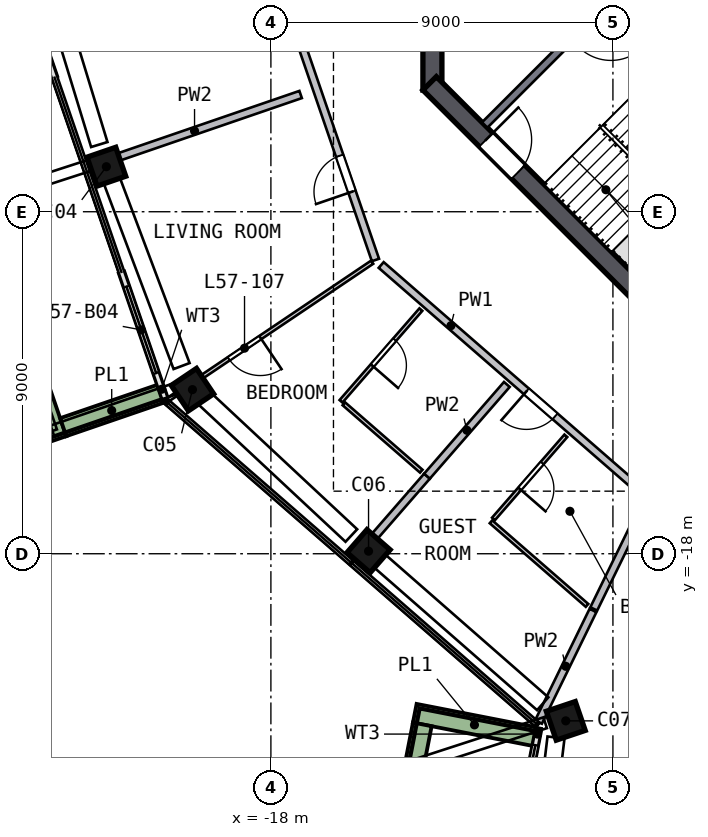
"""IFC4 building model, lengths in metres.
Left out: names, types, materials, properties, quantities, classifications, styles, units other than length and angle.
Written with IfcOpenShell. Run it as: python <this file> out.ifc"""

import sys

from ifc_helpers import new_model, si_unit, direction, frame, frame_2d, origin, origin_2d, place, context, subcontext, project, spatial, rectangle, extrude, element, fill, save


model = new_model("IFC4")
c1 = context("Model", 3, precision=1e-05, world=origin(), true_north=direction((0.0, 1.0)))
c2 = subcontext(c1, "Body", "Model", "MODEL_VIEW")
j1 = project(units=[si_unit("LENGTHUNIT", "METRE"), si_unit("PLANEANGLEUNIT", "RADIAN")], contexts=[c1])
p1 = place(None, origin())
s1 = spatial("IfcSite", under=j1, at=p1, CompositionType="ELEMENT")
p2 = place(p1, origin())
s2 = spatial("IfcBuilding", under=s1, at=p2, CompositionType="ELEMENT")
p3 = place(p2, frame((0.0, 0.0, 234.0)))
s3 = spatial("IfcBuildingStorey", under=s2, at=p3, CompositionType="ELEMENT", Elevation=234.0)
p4 = place(p3, frame((-22.375, -7.687, 0.0), z_axis=(0.037491609, -0.106162851, 0.9936417), x_axis=(0.322917335, -0.939706935, -0.112584504)))
e1 = element("IfcColumn", 1, at=p4, inside=s3, PredefinedType="COLUMN", context=c2, shape_type="SweptSolid", body=[
    extrude(rectangle(XDim=0.8, YDim=0.8, at=origin_2d()), origin(), (0.0, 0.0, 1.0), 3.21),
])
p5 = place(p3, frame((-20.143, -13.566, 0.0), z_axis=(0.06530323, -0.09525605, 0.993308498), x_axis=(-0.55467947, 0.824010563, 0.115487135)))
e2 = element("IfcColumn", 2, at=p5, inside=s3, PredefinedType="COLUMN", context=c2, shape_type="SweptSolid", body=[
    extrude(rectangle(XDim=0.8, YDim=0.8, at=origin_2d()), origin(), (0.0, 0.0, 1.0), 3.211),
])
p6 = place(p3, frame((-15.534, -17.844, 0.0), z_axis=(0.085478103, -0.073234353, 0.993644918), x_axis=(0.749060992, -0.652869631, -0.112556101)))
e3 = element("IfcColumn", 3, at=p6, inside=s3, PredefinedType="COLUMN", context=c2, shape_type="SweptSolid", body=[
    extrude(rectangle(XDim=0.8, YDim=0.8, at=origin_2d()), origin(), (0.0, 0.0, 1.0), 3.21),
])
p7 = place(p3, frame((-10.37, -22.34, 0.0), z_axis=(0.106638983, -0.048416987, 0.993118282), x_axis=(-0.317375559, 0.944907097, 0.080145701)))
e4 = element("IfcColumn", 4, at=p7, inside=s3, PredefinedType="COLUMN", context=c2, shape_type="SweptSolid", body=[
    extrude(rectangle(XDim=0.8, YDim=0.8, at=origin_2d()), origin(), (0.0, 0.0, 1.0), 3.212),
])
p8 = place(p3, frame((-13.75, 5.799, 0.0), z_axis=(0.0, 0.0, 1.0), x_axis=(0.0, -1.0, 0.0)))
e5 = element("IfcWall", 5, at=p8, inside=s3, PredefinedType="SHEAR", context=c2, shape_type="SweptSolid", body=[
    extrude(rectangle(XDim=11.598, YDim=0.5, at=frame_2d((5.799, 0.0))), origin(), (0.0, 0.0, 1.0), 3.5),
])
p9 = place(p8, frame((4.899, 0.0, 0.0)))
e6 = element("IfcOpeningElement", 6, at=p9, cuts=e5, PredefinedType="OPENING", context=c2, shape_type="SweptSolid", body=[
    extrude(rectangle(XDim=1.8, YDim=2.1, at=frame_2d((0.9, 1.05))), frame((0.0, 0.26, 0.0), z_axis=(0.0, -1.0, 0.0), x_axis=(1.0, 0.0, 0.0)), (0.0, 0.0, 1.0), 0.52),
])
p10 = place(p3, frame((-13.823, -5.622, 0.0), z_axis=(0.0, 0.0, 1.0), x_axis=(0.707106781, -0.707106781, 0.0)))
e7 = element("IfcWall", 7, at=p10, inside=s3, PredefinedType="SHEAR", context=c2, shape_type="SweptSolid", body=[
    extrude(rectangle(XDim=11.598, YDim=0.5, at=frame_2d((5.799, 0.0))), origin(), (0.0, 0.0, 1.0), 3.5),
])
p11 = place(p10, frame((2.099, 0.0, 0.0)))
e8 = element("IfcOpeningElement", 8, at=p11, cuts=e7, PredefinedType="OPENING", context=c2, shape_type="SweptSolid", body=[
    extrude(rectangle(XDim=1.2, YDim=2.1, at=frame_2d((0.6, 1.05))), frame((0.0, 0.26, 0.0), z_axis=(0.0, -1.0, 0.0), x_axis=(1.0, 0.0, 0.0)), (0.0, 0.0, 1.0), 0.52),
])
p12 = place(p3, frame((-24.951, -1.805, 0.0), z_axis=(0.0, 0.0, 1.0), x_axis=(0.324897842, -0.945749117, 0.0)))
e9 = element("IfcWall", 9, at=p12, inside=s3, PredefinedType="SOLIDWALL", context=c2, shape_type="SweptSolid", body=[
    extrude(rectangle(XDim=3.863, YDim=0.15, at=frame_2d((1.932, 0.0))), origin(), (0.0, 0.0, 1.0), 2.525),
])
p13 = place(p12, frame((1.063, 0.0, 0.0)))
e10 = element("IfcOpeningElement", 10, at=p13, cuts=e9, PredefinedType="OPENING", context=c2, shape_type="SweptSolid", body=[
    extrude(rectangle(XDim=2.4, YDim=2.4, at=frame_2d((1.2, 1.2))), frame((0.0, 0.085, 0.0), z_axis=(0.0, -1.0, 0.0), x_axis=(1.0, 0.0, 0.0)), (0.0, 0.0, 1.0), 0.17),
])
p14 = place(p3, frame((-21.93, -10.596, 0.0), z_axis=(0.0, 0.0, 1.0), x_axis=(0.324888935, -0.945752177, 0.0)))
e11 = element("IfcWall", 11, at=p14, inside=s3, PredefinedType="SOLIDWALL", context=c2, shape_type="SweptSolid", body=[
    extrude(rectangle(XDim=3.504, YDim=0.15, at=frame_2d((1.752, 0.0))), origin(), (0.0, 0.0, 1.0), 2.525),
])
p15 = place(p14, frame((0.4, 0.0, 0.0)))
e12 = element("IfcOpeningElement", 12, at=p15, cuts=e11, PredefinedType="OPENING", context=c2, shape_type="SweptSolid", body=[
    extrude(rectangle(XDim=2.4, YDim=2.4, at=frame_2d((1.2, 1.2))), frame((0.0, 0.085, 0.0), z_axis=(0.0, -1.0, 0.0), x_axis=(1.0, 0.0, 0.0)), (0.0, 0.0, 1.0), 0.17),
])
p16 = place(p3, frame((-10.965, -22.648, 0.0), z_axis=(0.0, 0.0, 1.0), x_axis=(-0.191492434, -0.981494089, 0.0)))
e13 = element("IfcWall", 13, at=p16, inside=s3, PredefinedType="SOLIDWALL", context=c2, shape_type="SweptSolid", body=[
    extrude(rectangle(XDim=3.2, YDim=0.15, at=frame_2d((1.6, 0.0))), origin(), (0.0, 0.0, 1.0), 2.525),
])
p17 = place(p16, frame((0.4, 0.0, 0.0)))
e14 = element("IfcOpeningElement", 14, at=p17, cuts=e13, PredefinedType="OPENING", context=c2, shape_type="SweptSolid", body=[
    extrude(rectangle(XDim=2.4, YDim=2.4, at=frame_2d((1.2, 1.2))), frame((0.0, 0.085, 0.0), z_axis=(0.0, -1.0, 0.0), x_axis=(1.0, 0.0, 0.0)), (0.0, 0.0, 1.0), 0.17),
])
p18 = place(p3, frame((-28.079, -2.009, 0.0), z_axis=(0.0, 0.0, 1.0), x_axis=(0.324897792, -0.945749134, 0.0)))
e15 = element("IfcWall", 15, at=p18, inside=s3, PredefinedType="SOLIDWALL", context=c2, shape_type="SweptSolid", body=[
    extrude(rectangle(XDim=13.724, YDim=0.5, at=frame_2d((6.862, 0.0))), origin(), (0.0, 0.0, 1.0), 0.7),
])
p19 = place(p3, frame((-23.465, -14.67, 0.0), z_axis=(0.0, 0.0, 1.0), x_axis=(0.945739598, 0.324925551, 0.0)))
e16 = element("IfcWall", 16, at=p19, inside=s3, PredefinedType="SOLIDWALL", context=c2, shape_type="SweptSolid", body=[
    extrude(rectangle(XDim=2.699, YDim=0.5, at=frame_2d((1.35, 0.0))), origin(), (0.0, 0.0, 1.0), 0.7),
])
p20 = place(p3, frame((-11.074, -22.81, 0.0), z_axis=(0.0, 0.0, 1.0), x_axis=(-0.981494441, 0.191490634, 0.0)))
e17 = element("IfcWall", 17, at=p20, inside=s3, PredefinedType="SOLIDWALL", context=c2, shape_type="SweptSolid", body=[
    extrude(rectangle(XDim=3.199, YDim=0.5, at=frame_2d((1.599, 0.0))), origin(), (0.0, 0.0, 1.0), 0.7),
])
p21 = place(p3, frame((-14.016, -22.49, 0.0), z_axis=(0.0, 0.0, 1.0), x_axis=(-0.191513122, -0.981490053, 0.0)))
e18 = element("IfcWall", 18, at=p21, inside=s3, PredefinedType="SOLIDWALL", context=c2, shape_type="SweptSolid", body=[
    extrude(rectangle(XDim=8.307, YDim=0.5, at=frame_2d((4.153, 0.0))), origin(), (0.0, 0.0, 1.0), 0.7),
])
p22 = place(p3, frame((-3.535, -9.334, 0.0), z_axis=(0.0, 0.0, 1.0), x_axis=(-0.707120946, 0.707092617, 0.0)))
e19 = element("IfcWall", 19, at=p22, inside=s3, PredefinedType="SOLIDWALL", context=c2, shape_type="SweptSolid", body=[
    extrude(rectangle(XDim=8.618, YDim=0.2, at=frame_2d((4.309, 0.0))), origin(), (0.0, 0.0, 1.0), 3.19),
])
p23 = place(p22, frame((6.6, 0.0, 0.0)))
e20 = element("IfcOpeningElement", 20, at=p23, cuts=e19, PredefinedType="OPENING", context=c2, shape_type="SweptSolid", body=[
    extrude(rectangle(XDim=1.2, YDim=2.1, at=frame_2d((0.6, 1.05))), frame((0.0, 0.11, 0.0), z_axis=(0.0, -1.0, 0.0), x_axis=(1.0, 0.0, 0.0)), (0.0, 0.0, 1.0), 0.22),
])
p24 = place(p3, frame((-9.334, -3.677, 0.0), z_axis=(0.0, 0.0, 1.0), x_axis=(-0.707135168, -0.707078393, 0.0)))
e21 = element("IfcWall", 21, at=p24, inside=s3, PredefinedType="SOLIDWALL", context=c2, shape_type="SweptSolid", body=[
    extrude(rectangle(XDim=4.3, YDim=0.2, at=frame_2d((2.15, 0.0))), origin(), (0.0, 0.0, 1.0), 3.19),
])
p25 = place(p3, frame((-15.249, -10.27, 0.0), z_axis=(0.0, 0.0, 1.0), x_axis=(-0.324901791, 0.94574776, 0.0)))
e22 = element("IfcWall", 22, at=p25, inside=s3, PredefinedType="SOLIDWALL", context=c2, shape_type="SweptSolid", body=[
    extrude(rectangle(XDim=9.316, YDim=0.2, at=frame_2d((4.658, 0.0))), origin(), (0.0, 0.0, 1.0), 3.19),
])
p26 = place(p25, frame((1.9, 0.0, 0.0)))
e23 = element("IfcOpeningElement", 23, at=p26, cuts=e22, PredefinedType="OPENING", context=c2, shape_type="SweptSolid", body=[
    extrude(rectangle(XDim=1.0, YDim=2.1, at=frame_2d((0.5, 1.05))), frame((0.0, 0.11, 0.0), z_axis=(0.0, -1.0, 0.0), x_axis=(1.0, 0.0, 0.0)), (0.0, 0.0, 1.0), 0.22),
])
p27 = place(p3, frame((-8.222, -16.387, 0.0), z_axis=(0.0, 0.0, 1.0), x_axis=(-0.754251424, 0.656585706, 0.0)))
e24 = element("IfcWall", 24, at=p27, inside=s3, PredefinedType="SOLIDWALL", context=c2, shape_type="SweptSolid", body=[
    extrude(rectangle(XDim=9.117, YDim=0.2, at=frame_2d((4.558, 0.0))), origin(), (0.0, 0.0, 1.0), 3.19),
])
p28 = place(p27, frame((3.05, 0.0, 0.0)))
e25 = element("IfcOpeningElement", 25, at=p28, cuts=e24, PredefinedType="OPENING", context=c2, shape_type="SweptSolid", body=[
    extrude(rectangle(XDim=1.0, YDim=2.1, at=frame_2d((0.5, 1.05))), frame((0.0, 0.11, 0.0), z_axis=(0.0, -1.0, 0.0), x_axis=(1.0, 0.0, 0.0)), (0.0, 0.0, 1.0), 0.22),
])
p29 = place(p3, frame((-17.218, -5.915, 0.0), z_axis=(0.0, 0.0, 1.0), x_axis=(-0.945735464, -0.324937582, 0.0)))
e26 = element("IfcWall", 26, at=p29, inside=s3, PredefinedType="SOLIDWALL", context=c2, shape_type="SweptSolid", body=[
    extrude(rectangle(XDim=5.903, YDim=0.2, at=frame_2d((2.951, 0.0))), origin(), (0.0, 0.0, 1.0), 3.19),
])
p30 = place(p3, frame((-13.892, -15.959, 0.0), z_axis=(0.0, 0.0, 1.0), x_axis=(-0.656586393, -0.754250826, 0.0)))
e27 = element("IfcWall", 27, at=p30, inside=s3, PredefinedType="SOLIDWALL", context=c2, shape_type="SweptSolid", body=[
    extrude(rectangle(XDim=2.95, YDim=0.2, at=frame_2d((1.475, 0.0))), origin(), (0.0, 0.0, 1.0), 3.19),
])
p31 = place(p3, frame((-11.791, -13.545, 0.0), z_axis=(0.0, 0.0, 1.0), x_axis=(-0.656590394, -0.754247343, 0.0)))
e28 = element("IfcWall", 28, at=p31, inside=s3, PredefinedType="SOLIDWALL", context=c2, shape_type="SweptSolid", body=[
    extrude(rectangle(XDim=3.2, YDim=0.2, at=frame_2d((1.6, 0.0))), origin(), (0.0, 0.0, 1.0), 3.19),
])
p32 = place(p3, frame((-10.959, -22.43, 0.0), z_axis=(0.0, 0.0, 1.0), x_axis=(0.438978354, 0.898497638, 0.0)))
e29 = element("IfcWall", 29, at=p32, inside=s3, PredefinedType="SOLIDWALL", context=c2, shape_type="SweptSolid", body=[
    extrude(rectangle(XDim=3.269, YDim=0.2, at=frame_2d((1.634, 0.0))), origin(), (0.0, 0.0, 1.0), 3.19),
])
p33 = place(p3, frame((-9.504, -19.452, 0.0), z_axis=(0.0, 0.0, 1.0), x_axis=(0.439039755, 0.898467636, 0.0)))
e30 = element("IfcWall", 30, at=p33, inside=s3, PredefinedType="SOLIDWALL", context=c2, shape_type="SweptSolid", body=[
    extrude(rectangle(XDim=3.161, YDim=0.2, at=frame_2d((1.581, 0.0))), origin(), (0.0, 0.0, 1.0), 3.19),
])
p34 = place(p3, frame((-15.335, -10.328, 0.0), z_axis=(0.0, 0.0, 1.0), x_axis=(-0.829425163, -0.558617847, 0.0)))
e31 = element("IfcWall", 31, at=p34, inside=s3, PredefinedType="PARTITIONING", context=c2, shape_type="SweptSolid", body=[
    extrude(rectangle(XDim=6.476, YDim=0.1, at=frame_2d((3.238, 0.0))), origin(), (0.0, 0.0, 1.0), 3.19),
])
p35 = place(p34, frame((3.55, 0.0, 0.0)))
e32 = element("IfcOpeningElement", 32, at=p35, cuts=e31, PredefinedType="OPENING", context=c2, shape_type="SweptSolid", body=[
    extrude(rectangle(XDim=1.0, YDim=2.1, at=frame_2d((0.5, 1.05))), frame((0.0, 0.06, 0.0), z_axis=(0.0, -1.0, 0.0), x_axis=(1.0, 0.0, 0.0)), (0.0, 0.0, 1.0), 0.12),
])
p36 = place(p3, frame((-14.054, -11.575, 0.0), z_axis=(0.0, 0.0, 1.0), x_axis=(-0.656552612, -0.754280232, 0.0)))
e33 = element("IfcWall", 33, at=p36, inside=s3, PredefinedType="PARTITIONING", context=c2, shape_type="SweptSolid", body=[
    extrude(rectangle(XDim=3.2, YDim=0.1, at=frame_2d((1.6, 0.0))), origin(), (0.0, 0.0, 1.0), 3.19),
])
p37 = place(p36, frame((1.05, 0.0, 0.0)))
e34 = element("IfcOpeningElement", 34, at=p37, cuts=e33, PredefinedType="OPENING", context=c2, shape_type="SweptSolid", body=[
    extrude(rectangle(XDim=0.9, YDim=2.1, at=frame_2d((0.45, 1.05))), frame((0.0, 0.06, 0.0), z_axis=(0.0, -1.0, 0.0), x_axis=(1.0, 0.0, 0.0)), (0.0, 0.0, 1.0), 0.12),
])
p38 = place(p3, frame((-16.08, -14.055, 0.0), z_axis=(0.0, 0.0, 1.0), x_axis=(0.754249155, -0.656588313, 0.0)))
e35 = element("IfcWall", 35, at=p38, inside=s3, PredefinedType="PARTITIONING", context=c2, shape_type="SweptSolid", body=[
    extrude(rectangle(XDim=2.7, YDim=0.1, at=frame_2d((1.35, 0.0))), origin(), (0.0, 0.0, 1.0), 3.19),
])
p39 = place(p3, frame((-10.239, -14.896, 0.0), z_axis=(0.0, 0.0, 1.0), x_axis=(-0.65654754, -0.754284646, 0.0)))
e36 = element("IfcWall", 36, at=p39, inside=s3, PredefinedType="PARTITIONING", context=c2, shape_type="SweptSolid", body=[
    extrude(rectangle(XDim=2.9, YDim=0.1, at=frame_2d((1.45, 0.0))), origin(), (0.0, 0.0, 1.0), 3.19),
])
p40 = place(p39, frame((0.95, 0.0, 0.0)))
e37 = element("IfcOpeningElement", 37, at=p40, cuts=e36, PredefinedType="OPENING", context=c2, shape_type="SweptSolid", body=[
    extrude(rectangle(XDim=0.9, YDim=2.1, at=frame_2d((0.45, 1.05))), frame((0.0, 0.06, 0.0), z_axis=(0.0, -1.0, 0.0), x_axis=(1.0, 0.0, 0.0)), (0.0, 0.0, 1.0), 0.12),
])
p41 = place(p3, frame((-9.681, -19.359, 0.0), z_axis=(0.0, 0.0, 1.0), x_axis=(-0.754239897, 0.656598948, 0.0)))
e38 = element("IfcWall", 38, at=p41, inside=s3, PredefinedType="PARTITIONING", context=c2, shape_type="SweptSolid", body=[
    extrude(rectangle(XDim=3.351, YDim=0.1, at=frame_2d((1.675, 0.0))), origin(), (0.0, 0.0, 1.0), 3.19),
])
p42 = place(p15, origin())
e39 = element("IfcDoor", 39, at=p42, inside=s3, OperationType="SLIDING_TO_RIGHT", PredefinedType="DOOR", context=c2, shape_type="SweptSolid", body=[
    extrude(rectangle(XDim=2.4, YDim=2.4, at=frame_2d((1.2, 1.2))), frame((0.0, 0.025, 0.0), z_axis=(0.0, -1.0, 0.0), x_axis=(1.0, 0.0, 0.0)), (0.0, 0.0, 1.0), 0.05),
])
fill(e12, e39)
p43 = place(p17, origin())
e40 = element("IfcDoor", 40, at=p43, inside=s3, OperationType="SLIDING_TO_LEFT", PredefinedType="DOOR", context=c2, shape_type="SweptSolid", body=[
    extrude(rectangle(XDim=2.4, YDim=2.4, at=frame_2d((1.2, 1.2))), frame((0.0, 0.025, 0.0), z_axis=(0.0, -1.0, 0.0), x_axis=(1.0, 0.0, 0.0)), (0.0, 0.0, 1.0), 0.05),
])
fill(e14, e40)
p44 = place(p11, origin())
e41 = element("IfcDoor", 41, at=p44, inside=s3, OperationType="SINGLE_SWING_LEFT", PredefinedType="DOOR", context=c2, shape_type="SweptSolid", body=[
    extrude(rectangle(XDim=1.2, YDim=2.1, at=frame_2d((0.6, 1.05))), frame((0.0, 0.025, 0.0), z_axis=(0.0, -1.0, 0.0), x_axis=(1.0, 0.0, 0.0)), (0.0, 0.0, 1.0), 0.05),
])
fill(e8, e41)
p45 = place(p26, origin())
e42 = element("IfcDoor", 42, at=p45, inside=s3, OperationType="SINGLE_SWING_LEFT", PredefinedType="DOOR", context=c2, shape_type="SweptSolid", body=[
    extrude(rectangle(XDim=1.0, YDim=2.1, at=frame_2d((0.5, 1.05))), frame((0.0, 0.025, 0.0), z_axis=(0.0, -1.0, 0.0), x_axis=(1.0, 0.0, 0.0)), (0.0, 0.0, 1.0), 0.05),
])
fill(e23, e42)
p46 = place(p35, origin())
e43 = element("IfcDoor", 43, at=p46, inside=s3, OperationType="SINGLE_SWING_LEFT", PredefinedType="DOOR", context=c2, shape_type="SweptSolid", body=[
    extrude(rectangle(XDim=1.0, YDim=2.1, at=frame_2d((0.5, 1.05))), frame((0.0, 0.025, 0.0), z_axis=(0.0, -1.0, 0.0), x_axis=(1.0, 0.0, 0.0)), (0.0, 0.0, 1.0), 0.05),
])
fill(e32, e43)
p47 = place(p37, origin())
e44 = element("IfcDoor", 44, at=p47, inside=s3, OperationType="SINGLE_SWING_RIGHT", PredefinedType="DOOR", context=c2, shape_type="SweptSolid", body=[
    extrude(rectangle(XDim=0.9, YDim=2.1, at=frame_2d((0.45, 1.05))), frame((0.0, 0.025, 0.0), z_axis=(0.0, -1.0, 0.0), x_axis=(1.0, 0.0, 0.0)), (0.0, 0.0, 1.0), 0.05),
])
fill(e34, e44)
p48 = place(p28, origin())
e45 = element("IfcDoor", 45, at=p48, inside=s3, OperationType="SINGLE_SWING_RIGHT", PredefinedType="DOOR", context=c2, shape_type="SweptSolid", body=[
    extrude(rectangle(XDim=1.0, YDim=2.1, at=frame_2d((0.5, 1.05))), frame((0.0, 0.025, 0.0), z_axis=(0.0, -1.0, 0.0), x_axis=(1.0, 0.0, 0.0)), (0.0, 0.0, 1.0), 0.05),
])
fill(e25, e45)
p49 = place(p40, origin())
e46 = element("IfcDoor", 46, at=p49, inside=s3, OperationType="SINGLE_SWING_RIGHT", PredefinedType="DOOR", context=c2, shape_type="SweptSolid", body=[
    extrude(rectangle(XDim=0.9, YDim=2.1, at=frame_2d((0.45, 1.05))), frame((0.0, 0.025, 0.0), z_axis=(0.0, -1.0, 0.0), x_axis=(1.0, 0.0, 0.0)), (0.0, 0.0, 1.0), 0.05),
])
fill(e37, e46)
save(model, sys.argv[1])
